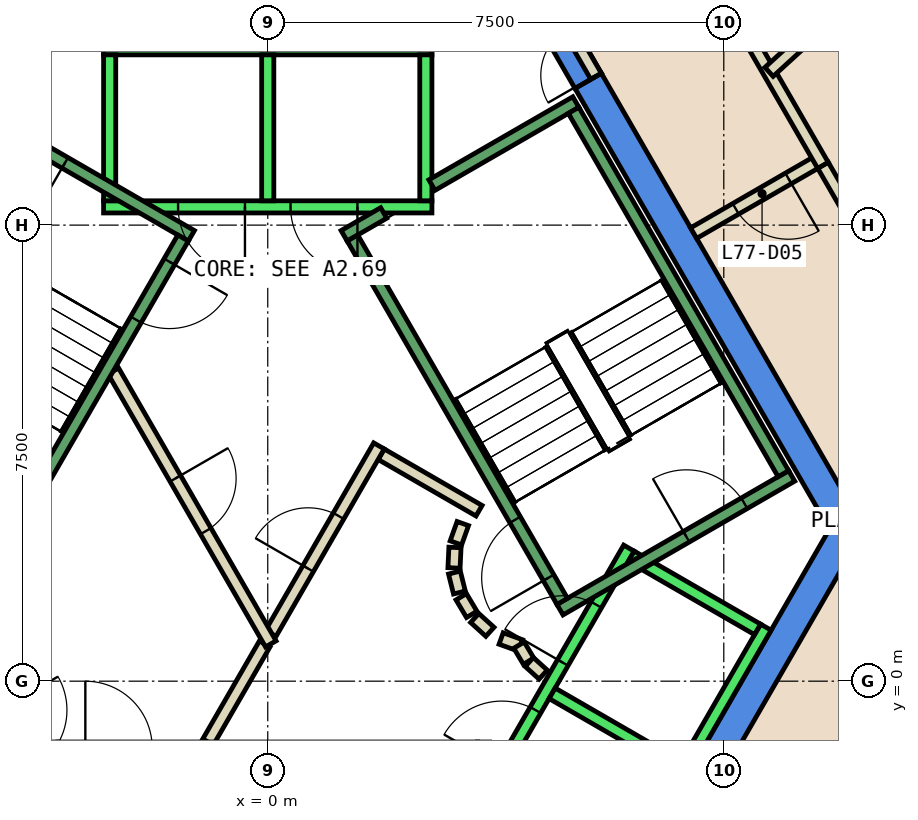
"""IFC4 building model, lengths in metres.
Left out: names, types, materials, properties, quantities, classifications, styles, units other than length and angle.
Written with IfcOpenShell. Run it as: python <this file> out.ifc"""

import sys

from ifc_helpers import new_model, si_unit, direction, frame, frame_2d, origin, place, context, subcontext, project, spatial, polyline, rectangle, outline, extrude, element, fill, save


model = new_model("IFC4")
c1 = context("Model", 3, precision=1e-05, world=origin(), true_north=direction((0.0, 1.0)))
c2 = subcontext(c1, "Body", "Model", "MODEL_VIEW")
j1 = project(units=[si_unit("LENGTHUNIT", "METRE"), si_unit("PLANEANGLEUNIT", "RADIAN")], contexts=[c1])
p1 = place(None, origin())
s1 = spatial("IfcSite", under=j1, at=p1, CompositionType="ELEMENT")
p2 = place(p1, origin())
s2 = spatial("IfcBuilding", under=s1, at=p2, CompositionType="ELEMENT")
p3 = place(p2, frame((0.0, 0.0, 326.0)))
s3 = spatial("IfcBuildingStorey", under=s2, at=p3, CompositionType="ELEMENT", Elevation=326.0)
p4 = place(p3, frame((0.0, 0.0, -0.6)))
e1 = element("IfcWall", 1, at=p4, inside=s3, PredefinedType="SHEAR", context=c2, shape_type="SweptSolid", body=[
    extrude(outline(polyline([(5.486, 9.998), (5.053, 9.748), (9.238, 2.5), (9.815, 2.5), (5.486, 9.998)])), origin(), (0.0, 0.0, 1.0), 5.55),
])
p5 = place(p3, frame((0.0, 0.0, 3.6)))
e2 = element("IfcWall", 2, at=p5, inside=s3, PredefinedType="SHEAR", context=c2, shape_type="SweptSolid", body=[
    extrude(outline(polyline([(5.022, 10.8), (4.677, 10.601), (4.619, 10.5), (5.053, 9.748), (5.486, 9.998), (5.022, 10.8)])), origin(), (0.0, 0.0, 1.0), 1.35),
])
p6 = place(p3, frame((0.0, 0.0, -0.6)))
e3 = element("IfcWall", 3, at=p6, inside=s3, PredefinedType="SHEAR", context=c2, shape_type="SweptSolid", body=[
    extrude(outline(polyline([(4.907, -6.0), (9.815, 2.5), (9.238, 2.5), (4.619, -5.5), (4.907, -6.0)])), origin(), (0.0, 0.0, 1.0), 5.55),
])
p7 = place(p3, frame((-0.982, -1.0, 0.0), z_axis=(0.0, 0.0, 1.0), x_axis=(0.50024047865, 0.865886518847, 0.0)))
e4 = element("IfcWall", 4, at=p7, inside=s3, PredefinedType="PARTITIONING", context=c2, shape_type="SweptSolid", body=[
    extrude(rectangle(XDim=1.863, YDim=0.2, at=frame_2d((0.931, 0.0))), origin(), (0.0, 0.0, 1.0), 4.95),
])
p8 = place(p3, frame((1.866, 3.732, 0.0), z_axis=(0.0, 0.0, 1.0), x_axis=(0.866043361281, -0.499968895414, 0.0)))
e5 = element("IfcWall", 5, at=p8, inside=s3, PredefinedType="PARTITIONING", context=c2, shape_type="SweptSolid", body=[
    extrude(rectangle(XDim=1.858, YDim=0.2, at=frame_2d((0.929, 0.0))), origin(), (0.0, 0.0, 1.0), 4.95),
])
p9 = place(p3, frame((3.208, 2.592, 0.0), z_axis=(0.0, 0.0, 1.0), x_axis=(-0.337388820924, -0.941365382578, 0.0)))
e6 = element("IfcWall", 6, at=p9, inside=s3, PredefinedType="PARTITIONING", context=c2, shape_type="SweptSolid", body=[
    extrude(rectangle(XDim=0.338, YDim=0.2, at=frame_2d((0.169, 0.0))), origin(), (0.0, 0.0, 1.0), 4.95),
])
p10 = place(p3, frame((3.079, 2.199, 0.0), z_axis=(0.0, 0.0, 1.0), x_axis=(-0.047771483479, -0.998858290933, 0.0)))
e7 = element("IfcWall", 7, at=p10, inside=s3, PredefinedType="PARTITIONING", context=c2, shape_type="SweptSolid", body=[
    extrude(rectangle(XDim=0.337, YDim=0.2, at=frame_2d((0.169, 0.0))), origin(), (0.0, 0.0, 1.0), 4.95),
])
p11 = place(p3, frame((3.07, 1.786, 0.0), z_axis=(0.0, 0.0, 1.0), x_axis=(0.242705583207, -0.970099994784, 0.0)))
e8 = element("IfcWall", 8, at=p11, inside=s3, PredefinedType="PARTITIONING", context=c2, shape_type="SweptSolid", body=[
    extrude(rectangle(XDim=0.338, YDim=0.2, at=frame_2d((0.169, 0.0))), origin(), (0.0, 0.0, 1.0), 4.95),
])
for number, where, z_axis, x_axis in (
    (9, (3.182, 1.388, 0.0), (0.0, 0.0, 1.0), (0.512, -0.859, 0.0)),
    (10, (3.404, 1.039, 0.0), (0.0, 0.0, 1.0), (0.74, -0.672, 0.0)),
):
    element("IfcWall", number, at=place(p3, frame(where, z_axis=z_axis, x_axis=x_axis)), inside=s3, PredefinedType="PARTITIONING", context=c2, shape_type="SweptSolid", body=[
        extrude(rectangle(XDim=0.338, YDim=0.2, at=frame_2d((0.169, 0.0))), origin(), (0.0, 0.0, 1.0), 4.95),
    ])
p12 = place(p3, frame((3.838, 0.702, 0.0), z_axis=(0.0, 0.0, 1.0), x_axis=(0.941035081519, -0.338308993895, 0.0)))
e11 = element("IfcWall", 11, at=p12, inside=s3, PredefinedType="PARTITIONING", context=c2, shape_type="SweptSolid", body=[
    extrude(rectangle(XDim=0.337, YDim=0.2, at=frame_2d((0.168, 0.0))), origin(), (0.0, 0.0, 1.0), 4.95),
])
p13 = place(p3, frame((4.132, 0.593, 0.0), z_axis=(0.0, 0.0, 1.0), x_axis=(0.513561617048, -0.858052717201, 0.0)))
e12 = element("IfcWall", 12, at=p13, inside=s3, PredefinedType="PARTITIONING", context=c2, shape_type="SweptSolid", body=[
    extrude(rectangle(XDim=0.308, YDim=0.2, at=frame_2d((0.154, 0.0))), origin(), (0.0, 0.0, 1.0), 4.95),
])
p14 = place(p3, frame((4.301, 0.315, 0.0), z_axis=(0.0, 0.0, 1.0), x_axis=(0.741798017506, -0.670623367639, 0.0)))
e13 = element("IfcWall", 13, at=p14, inside=s3, PredefinedType="PARTITIONING", context=c2, shape_type="SweptSolid", body=[
    extrude(rectangle(XDim=0.309, YDim=0.2, at=frame_2d((0.154, 0.0))), origin(), (0.0, 0.0, 1.0), 4.95),
])
p15 = place(p3, frame((0.05, 0.787, 0.0), z_axis=(0.0, 0.0, 1.0), x_axis=(0.499954076797, 0.866051915934, 0.0)))
e14 = element("IfcWall", 14, at=p15, inside=s3, PredefinedType="PARTITIONING", context=c2, shape_type="SweptSolid", body=[
    extrude(rectangle(XDim=3.558, YDim=0.2, at=frame_2d((1.779, 0.0))), origin(), (0.0, 0.0, 1.0), 4.95),
])
p16 = place(p15, frame((1.229, 0.0, 0.0)))
e15 = element("IfcOpeningElement", 15, at=p16, cuts=e14, PredefinedType="OPENING", context=c2, shape_type="SweptSolid", body=[
    extrude(rectangle(XDim=1.0, YDim=2.1, at=frame_2d((0.5, 1.05))), frame((0.0, 0.11, 0.0), z_axis=(0.0, -1.0, 0.0), x_axis=(1.0, 0.0, 0.0)), (0.0, 0.0, 1.0), 0.22),
])
p17 = place(p3, frame((-2.54, 5.1, 0.0), z_axis=(0.0, 0.0, 1.0), x_axis=(0.499925051871, -0.866068670783, 0.0)))
e16 = element("IfcWall", 16, at=p17, inside=s3, PredefinedType="PARTITIONING", context=c2, shape_type="SweptSolid", body=[
    extrude(rectangle(XDim=5.181, YDim=0.2, at=frame_2d((2.59, 0.0))), origin(), (0.0, 0.0, 1.0), 4.95),
])
p18 = place(p17, frame((2.04, 0.0, 0.0)))
e17 = element("IfcOpeningElement", 17, at=p18, cuts=e16, PredefinedType="OPENING", context=c2, shape_type="SweptSolid", body=[
    extrude(rectangle(XDim=1.0, YDim=2.1, at=frame_2d((0.5, 1.05))), frame((0.0, 0.11, 0.0), z_axis=(0.0, -1.0, 0.0), x_axis=(1.0, 0.0, 0.0)), (0.0, 0.0, 1.0), 0.22),
])
p19 = place(p3, frame((9.082, 8.568, 0.0), z_axis=(0.0, 0.0, 1.0), x_axis=(-0.865955154139, -0.50012165622, 0.0)))
e18 = element("IfcWall", 18, at=p19, inside=s3, PredefinedType="PARTITIONING", context=c2, shape_type="SweptSolid", body=[
    extrude(rectangle(XDim=2.4, YDim=0.2, at=frame_2d((1.2, 0.0))), origin(), (0.0, 0.0, 1.0), 4.95),
])
p20 = place(p19, frame((0.6, 0.0, 0.0)))
e19 = element("IfcOpeningElement", 19, at=p20, cuts=e18, PredefinedType="OPENING", context=c2, shape_type="SweptSolid", body=[
    extrude(rectangle(XDim=1.0, YDim=2.1, at=frame_2d((0.5, 1.05))), frame((0.0, 0.11, 0.0), z_axis=(0.0, -1.0, 0.0), x_axis=(1.0, 0.0, 0.0)), (0.0, 0.0, 1.0), 0.22),
])
p21 = place(p3, frame((5.532, 14.717, 0.0), z_axis=(0.0, 0.0, 1.0), x_axis=(0.499968011863, -0.866043871356, 0.0)))
e20 = element("IfcWall", 20, at=p21, inside=s3, PredefinedType="PARTITIONING", context=c2, shape_type="SweptSolid", body=[
    extrude(rectangle(XDim=7.201, YDim=0.2, at=frame_2d((3.6, 0.0))), origin(), (0.0, 0.0, 1.0), 4.95),
])
p22 = place(p21, frame((2.143, 0.0, 0.0)))
e21 = element("IfcOpeningElement", 21, at=p22, cuts=e20, PredefinedType="OPENING", context=c2, shape_type="SweptSolid", body=[
    extrude(rectangle(XDim=1.0, YDim=2.1, at=frame_2d((0.5, 1.05))), frame((0.0, 0.11, 0.0), z_axis=(0.0, -1.0, 0.0), x_axis=(1.0, 0.0, 0.0)), (0.0, 0.0, 1.0), 0.22),
])
p23 = place(p3, frame((9.133, 8.482, 0.0), z_axis=(0.0, 0.0, 1.0), x_axis=(0.499927291608, -0.866067377925, 0.0)))
e22 = element("IfcWall", 22, at=p23, inside=s3, PredefinedType="PARTITIONING", context=c2, shape_type="SweptSolid", body=[
    extrude(rectangle(XDim=1.788, YDim=0.2, at=frame_2d((0.894, 0.0))), origin(), (0.0, 0.0, 1.0), 4.95),
])
p24 = place(p3, frame((5.399, 9.948, 0.0), z_axis=(0.0, 0.0, 1.0), x_axis=(-0.499882215713, 0.866093395895, 0.0)))
e23 = element("IfcWall", 23, at=p24, inside=s3, PredefinedType="PARTITIONING", context=c2, shape_type="SweptSolid", body=[
    extrude(rectangle(XDim=0.926, YDim=0.2, at=frame_2d((0.463, 0.0))), origin(), (0.0, 0.0, 1.0), 2.4),
])
p25 = place(p24, frame((0.017, 0.0, 0.0)))
e24 = element("IfcOpeningElement", 24, at=p25, cuts=e23, PredefinedType="OPENING", context=c2, shape_type="SweptSolid", body=[
    extrude(rectangle(XDim=0.9, YDim=2.1, at=frame_2d((0.45, 1.05))), frame((0.0, 0.11, 0.0), z_axis=(0.0, -1.0, 0.0), x_axis=(1.0, 0.0, 0.0)), (0.0, 0.0, 1.0), 0.22),
])
p26 = place(p3, frame((12.564, 13.96, 0.0), z_axis=(0.0, 0.0, 1.0), x_axis=(-0.738865955228, -0.673852432069, 0.0)))
e25 = element("IfcWall", 25, at=p26, inside=s3, PredefinedType="PARTITIONING", context=c2, shape_type="SweptSolid", body=[
    extrude(rectangle(XDim=5.847, YDim=0.2, at=frame_2d((2.923, 0.0))), origin(), (0.0, 0.0, 1.0), 4.95),
])
p27 = place(p3, frame((2.7, 7.8, 0.0), z_axis=(0.0, 0.0, 1.0), x_axis=(-1.0, 0.0, 0.0)))
e26 = element("IfcWall", 26, at=p27, inside=s3, PredefinedType="STANDARD", context=c2, shape_type="SweptSolid", body=[
    extrude(rectangle(XDim=5.4, YDim=0.2, at=frame_2d((2.7, 0.0))), origin(), (0.0, 0.0, 1.0), 4.95),
])
p28 = place(p27, frame((1.225, 0.0, 0.0)))
e27 = element("IfcOpeningElement", 27, at=p28, cuts=e26, PredefinedType="OPENING", context=c2, shape_type="SweptSolid", body=[
    extrude(rectangle(XDim=1.1, YDim=2.1, at=frame_2d((0.55, 1.05))), frame((0.0, 0.11, 0.0), z_axis=(0.0, -1.0, 0.0), x_axis=(1.0, 0.0, 0.0)), (0.0, 0.0, 1.0), 0.22),
])
p29 = place(p27, frame((3.075, 0.0, 0.0)))
e28 = element("IfcOpeningElement", 28, at=p29, cuts=e26, PredefinedType="OPENING", context=c2, shape_type="SweptSolid", body=[
    extrude(rectangle(XDim=1.1, YDim=2.1, at=frame_2d((0.55, 1.05))), frame((0.0, 0.11, 0.0), z_axis=(0.0, -1.0, 0.0), x_axis=(1.0, 0.0, 0.0)), (0.0, 0.0, 1.0), 0.22),
])
p30 = place(p3, frame((2.7, 10.4, 0.0), z_axis=(0.0, 0.0, 1.0), x_axis=(-1.0, 0.0, 0.0)))
e29 = element("IfcWall", 29, at=p30, inside=s3, PredefinedType="STANDARD", context=c2, shape_type="SweptSolid", body=[
    extrude(rectangle(XDim=5.4, YDim=0.2, at=frame_2d((2.7, 0.0))), origin(), (0.0, 0.0, 1.0), 4.95),
])
for number, where, z_axis, x_axis in (
    (30, (2.6, 7.9, 0.0), (0.0, 0.0, 1.0), (0.0, 1.0, 0.0)),
    (31, (0.0, 7.9, 0.0), (0.0, 0.0, 1.0), (0.0, 1.0, 0.0)),
    (32, (-2.6, 7.9, 0.0), (0.0, 0.0, 1.0), (0.0, 1.0, 0.0)),
):
    element("IfcWall", number, at=place(p3, frame(where, z_axis=z_axis, x_axis=x_axis)), inside=s3, PredefinedType="STANDARD", context=c2, shape_type="SweptSolid", body=[
        extrude(rectangle(XDim=2.4, YDim=0.2, at=frame_2d((1.2, 0.0))), origin(), (0.0, 0.0, 1.0), 4.95),
    ])
p31 = place(p3, frame((-5.94, 2.188, 0.0), z_axis=(0.0, 0.0, 1.0), x_axis=(0.500034260056, -0.866005622828, 0.0)))
e33 = element("IfcWall", 33, at=p31, inside=s3, PredefinedType="STANDARD", context=c2, shape_type="SweptSolid", body=[
    extrude(rectangle(XDim=5.399, YDim=0.2, at=frame_2d((2.7, 0.0))), origin(), (0.0, 0.0, 1.0), 4.95),
])
p32 = place(p31, frame((3.075, 0.0, 0.0)))
e34 = element("IfcOpeningElement", 34, at=p32, cuts=e33, PredefinedType="OPENING", context=c2, shape_type="SweptSolid", body=[
    extrude(rectangle(XDim=1.1, YDim=2.1, at=frame_2d((0.55, 1.05))), frame((0.0, 0.11, 0.0), z_axis=(0.0, -1.0, 0.0), x_axis=(1.0, 0.0, 0.0)), (0.0, 0.0, 1.0), 0.22),
])
p33 = place(p31, frame((1.225, 0.0, 0.0)))
e35 = element("IfcOpeningElement", 35, at=p33, cuts=e33, PredefinedType="OPENING", context=c2, shape_type="SweptSolid", body=[
    extrude(rectangle(XDim=1.1, YDim=2.1, at=frame_2d((0.55, 1.05))), frame((0.0, 0.11, 0.0), z_axis=(0.0, -1.0, 0.0), x_axis=(1.0, 0.0, 0.0)), (0.0, 0.0, 1.0), 0.22),
])
p34 = place(p3, frame((3.24, -2.488, 0.0), z_axis=(0.0, 0.0, 1.0), x_axis=(0.500034260056, 0.866005622828, 0.0)))
e36 = element("IfcWall", 36, at=p34, inside=s3, PredefinedType="STANDARD", context=c2, shape_type="SweptSolid", body=[
    extrude(rectangle(XDim=5.399, YDim=0.2, at=frame_2d((2.7, 0.0))), origin(), (0.0, 0.0, 1.0), 4.95),
])
p35 = place(p34, frame((3.225, 0.0, 0.0)))
e37 = element("IfcOpeningElement", 37, at=p35, cuts=e36, PredefinedType="OPENING", context=c2, shape_type="SweptSolid", body=[
    extrude(rectangle(XDim=1.1, YDim=2.1, at=frame_2d((0.55, 1.05))), frame((0.0, 0.11, 0.0), z_axis=(0.0, -1.0, 0.0), x_axis=(1.0, 0.0, 0.0)), (0.0, 0.0, 1.0), 0.22),
])
p36 = place(p34, frame((1.225, 0.0, 0.0)))
e38 = element("IfcOpeningElement", 38, at=p36, cuts=e36, PredefinedType="OPENING", context=c2, shape_type="SweptSolid", body=[
    extrude(rectangle(XDim=1.1, YDim=2.1, at=frame_2d((0.55, 1.05))), frame((0.0, 0.11, 0.0), z_axis=(0.0, -1.0, 0.0), x_axis=(1.0, 0.0, 0.0)), (0.0, 0.0, 1.0), 0.22),
])
p37 = place(p3, frame((5.492, -3.788, 0.0), z_axis=(0.0, 0.0, 1.0), x_axis=(0.500034260056, 0.866005622828, 0.0)))
e39 = element("IfcWall", 39, at=p37, inside=s3, PredefinedType="STANDARD", context=c2, shape_type="SweptSolid", body=[
    extrude(rectangle(XDim=5.399, YDim=0.2, at=frame_2d((2.7, 0.0))), origin(), (0.0, 0.0, 1.0), 4.95),
])
for number, where, z_axis, x_axis in (
    (40, (4.677, -0.2, 0.0), (0.0, 0.0, 1.0), (0.866, -0.5, 0.0)),
    (41, (5.977, 2.052, 0.0), (0.0, 0.0, 1.0), (0.866, -0.5, 0.0)),
):
    element("IfcWall", number, at=place(p3, frame(where, z_axis=z_axis, x_axis=x_axis)), inside=s3, PredefinedType="STANDARD", context=c2, shape_type="SweptSolid", body=[
        extrude(rectangle(XDim=2.399, YDim=0.2, at=frame_2d((1.2, 0.0))), origin(), (0.0, 0.0, 1.0), 4.95),
    ])
p38 = place(p3, frame((4.806, 1.176, 0.0), z_axis=(0.0, 0.0, 1.0), x_axis=(0.866059941101, 0.499940174841, 0.0)))
e42 = element("IfcWall", 42, at=p38, inside=s3, PredefinedType="STANDARD", context=c2, shape_type="SweptSolid", body=[
    extrude(rectangle(XDim=4.4, YDim=0.2, at=frame_2d((2.2, 0.0))), origin(), (0.0, 0.0, 1.0), 4.95),
])
p39 = place(p38, frame((2.4, 0.0, 0.0)))
e43 = element("IfcOpeningElement", 43, at=p39, cuts=e42, PredefinedType="OPENING", context=c2, shape_type="SweptSolid", body=[
    extrude(rectangle(XDim=1.1, YDim=2.2, at=frame_2d((0.55, 1.1))), frame((0.0, 0.11, 0.0), z_axis=(0.0, -1.0, 0.0), x_axis=(1.0, 0.0, 0.0)), (0.0, 0.0, 1.0), 0.22),
])
p40 = place(p3, frame((2.7, 8.158, 0.0), z_axis=(0.0, 0.0, 1.0), x_axis=(0.86611865017, 0.499838457731, 0.0)))
e44 = element("IfcWall", 44, at=p40, inside=s3, PredefinedType="STANDARD", context=c2, shape_type="SweptSolid", body=[
    extrude(rectangle(XDim=2.733, YDim=0.2, at=frame_2d((1.366, 0.0))), origin(), (0.0, 0.0, 1.0), 4.95),
])
p41 = place(p3, frame((1.256, 7.324, 0.0), z_axis=(0.0, 0.0, 1.0), x_axis=(0.865915093549, 0.500191014278, 0.0)))
e45 = element("IfcWall", 45, at=p41, inside=s3, PredefinedType="STANDARD", context=c2, shape_type="SweptSolid", body=[
    extrude(rectangle(XDim=0.752, YDim=0.2, at=frame_2d((0.376, 0.0))), origin(), (0.0, 0.0, 1.0), 4.95),
])
p42 = place(p3, frame((4.843, 1.312, 0.0), z_axis=(0.0, 0.0, 1.0), x_axis=(-0.499963383562, 0.866046543262, 0.0)))
e46 = element("IfcWall", 46, at=p42, inside=s3, PredefinedType="STANDARD", context=c2, shape_type="SweptSolid", body=[
    extrude(rectangle(XDim=6.9, YDim=0.2, at=frame_2d((3.45, 0.0))), origin(), (0.0, 0.0, 1.0), 4.95),
])
p43 = place(p42, frame((0.45, 0.0, 0.0)))
e47 = element("IfcOpeningElement", 47, at=p43, cuts=e46, PredefinedType="OPENING", context=c2, shape_type="SweptSolid", body=[
    extrude(rectangle(XDim=1.1, YDim=2.2, at=frame_2d((0.55, 1.1))), frame((0.0, 0.11, 0.0), z_axis=(0.0, -1.0, 0.0), x_axis=(1.0, 0.0, 0.0)), (0.0, 0.0, 1.0), 0.22),
])
p44 = place(p3, frame((8.48, 3.412, 0.0), z_axis=(0.0, 0.0, 1.0), x_axis=(-0.499978703459, 0.866037698999, 0.0)))
e48 = element("IfcWall", 48, at=p44, inside=s3, PredefinedType="STANDARD", context=c2, shape_type="SweptSolid", body=[
    extrude(rectangle(XDim=6.9, YDim=0.2, at=frame_2d((3.45, 0.0))), origin(), (0.0, 0.0, 1.0), 4.95),
])
p45 = place(p3, frame((-1.256, 7.324, 0.0), z_axis=(0.0, 0.0, 1.0), x_axis=(-0.866046073146, 0.499964197906, 0.0)))
e49 = element("IfcWall", 49, at=p45, inside=s3, PredefinedType="STANDARD", context=c2, shape_type="SweptSolid", body=[
    extrude(rectangle(XDim=4.4, YDim=0.2, at=frame_2d((2.2, 0.0))), origin(), (0.0, 0.0, 1.0), 4.95),
])
p46 = place(p45, frame((2.4, 0.0, 0.0)))
e50 = element("IfcOpeningElement", 50, at=p46, cuts=e49, PredefinedType="OPENING", context=c2, shape_type="SweptSolid", body=[
    extrude(rectangle(XDim=1.1, YDim=2.2, at=frame_2d((0.55, 1.1))), frame((0.0, 0.11, 0.0), z_axis=(0.0, -1.0, 0.0), x_axis=(1.0, 0.0, 0.0)), (0.0, 0.0, 1.0), 0.22),
])
p47 = place(p3, frame((-1.393, 7.288, 0.0), z_axis=(0.0, 0.0, 1.0), x_axis=(-0.499963383562, -0.866046543262, 0.0)))
e51 = element("IfcWall", 51, at=p47, inside=s3, PredefinedType="STANDARD", context=c2, shape_type="SweptSolid", body=[
    extrude(rectangle(XDim=6.9, YDim=0.2, at=frame_2d((3.45, 0.0))), origin(), (0.0, 0.0, 1.0), 4.95),
])
p48 = place(p47, frame((0.45, 0.0, 0.0)))
e52 = element("IfcOpeningElement", 52, at=p48, cuts=e51, PredefinedType="OPENING", context=c2, shape_type="SweptSolid", body=[
    extrude(rectangle(XDim=1.1, YDim=2.2, at=frame_2d((0.55, 1.1))), frame((0.0, 0.11, 0.0), z_axis=(0.0, -1.0, 0.0), x_axis=(1.0, 0.0, 0.0)), (0.0, 0.0, 1.0), 0.22),
])
p49 = place(p20, origin())
e53 = element("IfcDoor", 53, at=p49, inside=s3, OperationType="SINGLE_SWING_LEFT", PredefinedType="DOOR", context=c2, shape_type="SweptSolid", body=[
    extrude(rectangle(XDim=1.0, YDim=2.1, at=frame_2d((0.5, 1.05))), frame((0.0, 0.025, 0.0), z_axis=(0.0, -1.0, 0.0), x_axis=(1.0, 0.0, 0.0)), (0.0, 0.0, 1.0), 0.05),
])
fill(e19, e53)
p50 = place(p16, origin())
e54 = element("IfcDoor", 54, at=p50, inside=s3, OperationType="SINGLE_SWING_RIGHT", PredefinedType="DOOR", context=c2, shape_type="SweptSolid", body=[
    extrude(rectangle(XDim=1.0, YDim=2.1, at=frame_2d((0.5, 1.05))), frame((0.0, 0.025, 0.0), z_axis=(0.0, -1.0, 0.0), x_axis=(1.0, 0.0, 0.0)), (0.0, 0.0, 1.0), 0.05),
])
fill(e15, e54)
p51 = place(p18, origin())
e55 = element("IfcDoor", 55, at=p51, inside=s3, OperationType="SINGLE_SWING_RIGHT", PredefinedType="DOOR", context=c2, shape_type="SweptSolid", body=[
    extrude(rectangle(XDim=1.0, YDim=2.1, at=frame_2d((0.5, 1.05))), frame((0.0, 0.025, 0.0), z_axis=(0.0, -1.0, 0.0), x_axis=(1.0, 0.0, 0.0)), (0.0, 0.0, 1.0), 0.05),
])
fill(e17, e55)
p52 = place(p25, origin())
e56 = element("IfcDoor", 56, at=p52, inside=s3, OperationType="SINGLE_SWING_LEFT", PredefinedType="DOOR", context=c2, shape_type="SweptSolid", body=[
    extrude(rectangle(XDim=0.9, YDim=2.1, at=frame_2d((0.45, 1.05))), frame((0.0, 0.025, 0.0), z_axis=(0.0, -1.0, 0.0), x_axis=(1.0, 0.0, 0.0)), (0.0, 0.0, 1.0), 0.05),
])
fill(e24, e56)
p53 = place(p28, origin())
e57 = element("IfcDoor", 57, at=p53, inside=s3, OperationType="SLIDING_TO_LEFT", PredefinedType="DOOR", context=c2, shape_type="SweptSolid", body=[
    extrude(rectangle(XDim=1.1, YDim=2.1, at=frame_2d((0.55, 1.05))), frame((0.0, 0.025, 0.0), z_axis=(0.0, -1.0, 0.0), x_axis=(1.0, 0.0, 0.0)), (0.0, 0.0, 1.0), 0.05),
])
fill(e27, e57)
p54 = place(p29, origin())
e58 = element("IfcDoor", 58, at=p54, inside=s3, OperationType="SLIDING_TO_LEFT", PredefinedType="DOOR", context=c2, shape_type="SweptSolid", body=[
    extrude(rectangle(XDim=1.1, YDim=2.1, at=frame_2d((0.55, 1.05))), frame((0.0, 0.025, 0.0), z_axis=(0.0, -1.0, 0.0), x_axis=(1.0, 0.0, 0.0)), (0.0, 0.0, 1.0), 0.05),
])
fill(e28, e58)
p55 = place(p35, origin())
e59 = element("IfcDoor", 59, at=p55, inside=s3, OperationType="SLIDING_TO_LEFT", PredefinedType="DOOR", context=c2, shape_type="SweptSolid", body=[
    extrude(rectangle(XDim=1.1, YDim=2.1, at=frame_2d((0.55, 1.05))), frame((0.0, 0.025, 0.0), z_axis=(0.0, -1.0, 0.0), x_axis=(1.0, 0.0, 0.0)), (0.0, 0.0, 1.0), 0.05),
])
fill(e37, e59)
p56 = place(p36, origin())
e60 = element("IfcDoor", 60, at=p56, inside=s3, OperationType="SLIDING_TO_LEFT", PredefinedType="DOOR", context=c2, shape_type="SweptSolid", body=[
    extrude(rectangle(XDim=1.1, YDim=2.1, at=frame_2d((0.55, 1.05))), frame((0.0, 0.025, 0.0), z_axis=(0.0, -1.0, 0.0), x_axis=(1.0, 0.0, 0.0)), (0.0, 0.0, 1.0), 0.05),
])
fill(e38, e60)
p57 = place(p43, origin())
e61 = element("IfcDoor", 61, at=p57, inside=s3, OperationType="SINGLE_SWING_LEFT", PredefinedType="DOOR", context=c2, shape_type="SweptSolid", body=[
    extrude(rectangle(XDim=1.1, YDim=2.2, at=frame_2d((0.55, 1.1))), frame((0.0, 0.025, 0.0), z_axis=(0.0, -1.0, 0.0), x_axis=(1.0, 0.0, 0.0)), (0.0, 0.0, 1.0), 0.05),
])
fill(e47, e61)
p58 = place(p39, origin())
e62 = element("IfcDoor", 62, at=p58, inside=s3, OperationType="SINGLE_SWING_LEFT", PredefinedType="DOOR", context=c2, shape_type="SweptSolid", body=[
    extrude(rectangle(XDim=1.1, YDim=2.2, at=frame_2d((0.55, 1.1))), frame((0.0, 0.025, 0.0), z_axis=(0.0, -1.0, 0.0), x_axis=(1.0, 0.0, 0.0)), (0.0, 0.0, 1.0), 0.05),
])
fill(e43, e62)
p59 = place(p48, origin())
e63 = element("IfcDoor", 63, at=p59, inside=s3, OperationType="SINGLE_SWING_LEFT", PredefinedType="DOOR", context=c2, shape_type="SweptSolid", body=[
    extrude(rectangle(XDim=1.1, YDim=2.2, at=frame_2d((0.55, 1.1))), frame((0.0, 0.025, 0.0), z_axis=(0.0, -1.0, 0.0), x_axis=(1.0, 0.0, 0.0)), (0.0, 0.0, 1.0), 0.05),
])
fill(e52, e63)
p60 = place(p46, origin())
e64 = element("IfcDoor", 64, at=p60, inside=s3, OperationType="SINGLE_SWING_LEFT", PredefinedType="DOOR", context=c2, shape_type="SweptSolid", body=[
    extrude(rectangle(XDim=1.1, YDim=2.2, at=frame_2d((0.55, 1.1))), frame((0.0, 0.025, 0.0), z_axis=(0.0, -1.0, 0.0), x_axis=(1.0, 0.0, 0.0)), (0.0, 0.0, 1.0), 0.05),
])
fill(e50, e64)
save(model, sys.argv[1])
